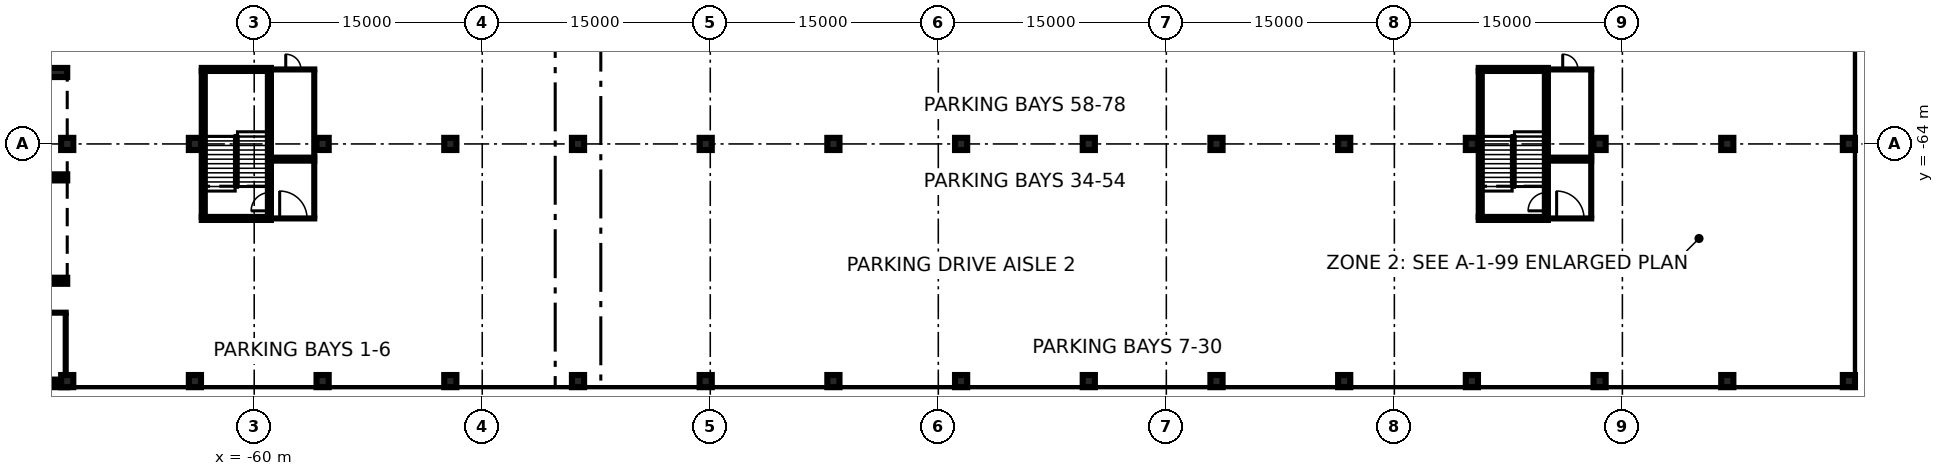
"""IFC4 building model, lengths in metres.
Left out: names, types, materials, properties, quantities, classifications, styles, units other than length and angle.
Written with IfcOpenShell. Run it as: python <this file> out.ifc"""

import sys

from ifc_helpers import new_model, si_unit, direction, frame, frame_2d, origin, origin_2d, place, context, subcontext, project, spatial, rectangle, extrude, element, fill, save


model = new_model("IFC4")
c1 = context("Model", 3, precision=1e-05, world=origin(), true_north=direction((0.0, 1.0)))
c2 = subcontext(c1, "Body", "Model", "MODEL_VIEW")
j1 = project(units=[si_unit("LENGTHUNIT", "METRE"), si_unit("PLANEANGLEUNIT", "RADIAN")], contexts=[c1])
p1 = place(None, origin())
s1 = spatial("IfcSite", under=j1, at=p1, CompositionType="ELEMENT")
p2 = place(p1, origin())
s2 = spatial("IfcBuilding", under=s1, at=p2, CompositionType="ELEMENT")
p3 = place(p2, frame((0.0, 0.0, -12.0)))
s3 = spatial("IfcBuildingStorey", under=s2, at=p3, CompositionType="ELEMENT", Elevation=-12.0)
p4 = place(p3, frame((-123.6, -80.45, 0.0), z_axis=(0.0, 0.0, 1.0), x_axis=(1.0, 0.0, 0.0)))
e1 = element("IfcWall", 1, at=p4, inside=s3, PredefinedType="USERDEFINED", context=c2, shape_type="SweptSolid", body=[
    extrude(rectangle(XDim=169.8, YDim=0.9, at=frame_2d((84.9, 0.0))), origin(), (0.0, 0.0, 1.0), 11.55),
])
p5 = place(p3, frame((45.75, -80.0, 0.0), z_axis=(0.0, 0.0, 1.0), x_axis=(0.0, 1.0, 0.0)))
e2 = element("IfcWall", 2, at=p5, inside=s3, PredefinedType="USERDEFINED", context=c2, shape_type="SweptSolid", body=[
    extrude(rectangle(XDim=160.0, YDim=0.9, at=frame_2d((80.0, 0.0))), origin(), (0.0, 0.0, 1.0), 11.55),
])
p6 = place(p2, frame((0.0, 0.0, -3.6)))
s4 = spatial("IfcBuildingStorey", under=s2, at=p6, CompositionType="ELEMENT", Elevation=-3.6)
for number, where, z_axis, x_axis in (
    (3, (-72.3, -79.6, -0.4), (0.0, 0.0, 1.0), (1.0, 0.0, 0.0)),
    (4, (-72.3, -64.0, -0.4), (0.0, 0.0, 1.0), (1.0, 0.0, 0.0)),
    (5, (-63.9, -79.6, -0.4), (0.0, 0.0, 1.0), (1.0, 0.0, 0.0)),
    (6, (-63.9, -64.0, -0.4), (0.0, 0.0, 1.0), (1.0, 0.0, 0.0)),
    (7, (-55.5, -79.6, -0.4), (0.0, 0.0, 1.0), (1.0, 0.0, 0.0)),
    (8, (-55.5, -64.0, -0.4), (0.0, 0.0, 1.0), (1.0, 0.0, 0.0)),
    (9, (-47.1, -79.6, -0.4), (0.0, 0.0, 1.0), (1.0, 0.0, 0.0)),
    (10, (-47.1, -64.0, -0.4), (0.0, 0.0, 1.0), (1.0, 0.0, 0.0)),
    (11, (-38.7, -79.6, -0.4), (0.0, 0.0, 1.0), (1.0, 0.0, 0.0)),
    (12, (-38.7, -64.0, -0.4), (0.0, 0.0, 1.0), (1.0, 0.0, 0.0)),
    (13, (-30.3, -79.6, -0.4), (0.0, 0.0, 1.0), (1.0, 0.0, 0.0)),
    (14, (-30.3, -64.0, -0.4), (0.0, 0.0, 1.0), (1.0, 0.0, 0.0)),
    (15, (-21.9, -79.6, -0.4), (0.0, 0.0, 1.0), (1.0, 0.0, 0.0)),
    (16, (-21.9, -64.0, -0.4), (0.0, 0.0, 1.0), (1.0, 0.0, 0.0)),
    (17, (-13.5, -79.6, -0.4), (0.0, 0.0, 1.0), (1.0, 0.0, 0.0)),
    (18, (-13.5, -64.0, -0.4), (0.0, 0.0, 1.0), (1.0, 0.0, 0.0)),
    (19, (-5.1, -79.6, -0.4), (0.0, 0.0, 1.0), (1.0, 0.0, 0.0)),
    (20, (-5.1, -64.0, -0.4), (0.0, 0.0, 1.0), (1.0, 0.0, 0.0)),
    (21, (3.3, -79.6, -0.4), (0.0, 0.0, 1.0), (1.0, 0.0, 0.0)),
    (22, (3.3, -64.0, -0.4), (0.0, 0.0, 1.0), (1.0, 0.0, 0.0)),
    (23, (11.7, -79.6, -0.4), (0.0, 0.0, 1.0), (1.0, 0.0, 0.0)),
    (24, (11.7, -64.0, -0.4), (0.0, 0.0, 1.0), (1.0, 0.0, 0.0)),
    (25, (20.1, -79.6, -0.4), (0.0, 0.0, 1.0), (1.0, 0.0, 0.0)),
    (26, (20.1, -64.0, -0.4), (0.0, 0.0, 1.0), (1.0, 0.0, 0.0)),
    (27, (28.5, -79.6, -0.4), (0.0, 0.0, 1.0), (1.0, 0.0, 0.0)),
    (28, (28.5, -64.0, -0.4), (0.0, 0.0, 1.0), (1.0, 0.0, 0.0)),
    (29, (36.9, -79.6, -0.4), (0.0, 0.0, 1.0), (1.0, 0.0, 0.0)),
    (30, (36.9, -64.0, -0.4), (0.0, 0.0, 1.0), (1.0, 0.0, 0.0)),
    (31, (44.9, -79.6, -0.4), (0.0, 0.0, 1.0), (1.0, 0.0, 0.0)),
    (32, (44.9, -64.0, -0.4), (0.0, 0.0, 1.0), (1.0, 0.0, 0.0)),
):
    element("IfcColumn", number, at=place(p6, frame(where, z_axis=z_axis, x_axis=x_axis)), inside=s4, PredefinedType="COLUMN", context=c2, shape_type="SweptSolid", body=[
        extrude(rectangle(XDim=0.8, YDim=0.8, at=origin_2d()), origin(), (0.0, 0.0, 1.0), 3.55),
    ])
p7 = place(p6, frame((-79.3, -79.5, 0.0), z_axis=(0.0, 0.0, 1.0), x_axis=(1.0, 0.0, 0.0)))
e33 = element("IfcWall", 33, at=p7, inside=s4, PredefinedType="PARTITIONING", context=c2, shape_type="SweptSolid", body=[
    extrude(rectangle(XDim=7.0, YDim=0.2, at=frame_2d((3.5, 0.0))), origin(), (0.0, 0.0, 1.0), 3.15),
])
p8 = place(p6, frame((-79.3, -75.1, 0.0), z_axis=(0.0, 0.0, 1.0), x_axis=(1.0, 0.0, 0.0)))
e34 = element("IfcWall", 34, at=p8, inside=s4, PredefinedType="PARTITIONING", context=c2, shape_type="SweptSolid", body=[
    extrude(rectangle(XDim=7.0, YDim=0.2, at=frame_2d((3.5, 0.0))), origin(), (0.0, 0.0, 1.0), 3.15),
])
p9 = place(p8, frame((3.0, 0.0, 0.0)))
e35 = element("IfcOpeningElement", 35, at=p9, cuts=e34, PredefinedType="OPENING", context=c2, shape_type="SweptSolid", body=[
    extrude(rectangle(XDim=1.0, YDim=2.1, at=frame_2d((0.5, 1.05))), frame((0.0, 0.11, 0.0), z_axis=(0.0, -1.0, 0.0), x_axis=(1.0, 0.0, 0.0)), (0.0, 0.0, 1.0), 0.22),
])
p10 = place(p6, frame((-72.4, -79.2, 0.0), z_axis=(0.0, 0.0, 1.0), x_axis=(0.0, 1.0, 0.0)))
e36 = element("IfcWall", 36, at=p10, inside=s4, PredefinedType="PARTITIONING", context=c2, shape_type="SweptSolid", body=[
    extrude(rectangle(XDim=4.0, YDim=0.2, at=frame_2d((2.0, 0.0))), origin(), (0.0, 0.0, 1.0), 3.15),
])
p11 = place(p6, frame((-58.9, -68.9, 0.0), z_axis=(0.0, 0.0, 1.0), x_axis=(1.0, 0.0, 0.0)))
e37 = element("IfcWall", 37, at=p11, inside=s4, PredefinedType="PARTITIONING", context=c2, shape_type="SweptSolid", body=[
    extrude(rectangle(XDim=2.95, YDim=0.2, at=frame_2d((1.475, 0.0))), origin(), (0.0, 0.0, 1.0), 3.15),
])
p12 = place(p11, frame((0.575, 0.0, 0.0)))
e38 = element("IfcOpeningElement", 38, at=p12, cuts=e37, PredefinedType="OPENING", context=c2, shape_type="SweptSolid", body=[
    extrude(rectangle(XDim=1.8, YDim=2.1, at=frame_2d((0.9, 1.05))), frame((0.0, 0.11, 0.0), z_axis=(0.0, -1.0, 0.0), x_axis=(1.0, 0.0, 0.0)), (0.0, 0.0, 1.0), 0.22),
])
p13 = place(p6, frame((-58.9, -65.1, 0.0), z_axis=(0.0, 0.0, 1.0), x_axis=(1.0, 0.0, 0.0)))
e39 = element("IfcWall", 39, at=p13, inside=s4, PredefinedType="PARTITIONING", context=c2, shape_type="SweptSolid", body=[
    extrude(rectangle(XDim=2.95, YDim=0.2, at=frame_2d((1.475, 0.0))), origin(), (0.0, 0.0, 1.0), 3.15),
])
p14 = place(p6, frame((-56.05, -68.8, 0.0), z_axis=(0.0, 0.0, 1.0), x_axis=(0.0, 1.0, 0.0)))
e40 = element("IfcWall", 40, at=p14, inside=s4, PredefinedType="PARTITIONING", context=c2, shape_type="SweptSolid", body=[
    extrude(rectangle(XDim=3.6, YDim=0.2, at=frame_2d((1.8, 0.0))), origin(), (0.0, 0.0, 1.0), 3.15),
])
p15 = place(p6, frame((-58.9, -64.9, 0.0), z_axis=(0.0, 0.0, 1.0), x_axis=(1.0, 0.0, 0.0)))
e41 = element("IfcWall", 41, at=p15, inside=s4, PredefinedType="PARTITIONING", context=c2, shape_type="SweptSolid", body=[
    extrude(rectangle(XDim=2.95, YDim=0.2, at=frame_2d((1.475, 0.0))), origin(), (0.0, 0.0, 1.0), 3.15),
])
p16 = place(p6, frame((-58.9, -59.1, 0.0), z_axis=(0.0, 0.0, 1.0), x_axis=(1.0, 0.0, 0.0)))
e42 = element("IfcWall", 42, at=p16, inside=s4, PredefinedType="PARTITIONING", context=c2, shape_type="SweptSolid", body=[
    extrude(rectangle(XDim=2.95, YDim=0.2, at=frame_2d((1.475, 0.0))), origin(), (0.0, 0.0, 1.0), 3.15),
])
p17 = place(p16, frame((0.975, 0.0, 0.0)))
e43 = element("IfcOpeningElement", 43, at=p17, cuts=e42, PredefinedType="OPENING", context=c2, shape_type="SweptSolid", body=[
    extrude(rectangle(XDim=1.0, YDim=2.1, at=frame_2d((0.5, 1.05))), frame((0.0, 0.11, 0.0), z_axis=(0.0, -1.0, 0.0), x_axis=(1.0, 0.0, 0.0)), (0.0, 0.0, 1.0), 0.22),
])
p18 = place(p6, frame((-56.05, -64.8, 0.0), z_axis=(0.0, 0.0, 1.0), x_axis=(0.0, 1.0, 0.0)))
e44 = element("IfcWall", 44, at=p18, inside=s4, PredefinedType="PARTITIONING", context=c2, shape_type="SweptSolid", body=[
    extrude(rectangle(XDim=5.6, YDim=0.2, at=frame_2d((2.8, 0.0))), origin(), (0.0, 0.0, 1.0), 3.15),
])
p19 = place(p6, frame((25.1, -68.9, 0.0), z_axis=(0.0, 0.0, 1.0), x_axis=(1.0, 0.0, 0.0)))
e45 = element("IfcWall", 45, at=p19, inside=s4, PredefinedType="PARTITIONING", context=c2, shape_type="SweptSolid", body=[
    extrude(rectangle(XDim=2.95, YDim=0.2, at=frame_2d((1.475, 0.0))), origin(), (0.0, 0.0, 1.0), 3.15),
])
p20 = place(p19, frame((0.575, 0.0, 0.0)))
e46 = element("IfcOpeningElement", 46, at=p20, cuts=e45, PredefinedType="OPENING", context=c2, shape_type="SweptSolid", body=[
    extrude(rectangle(XDim=1.8, YDim=2.1, at=frame_2d((0.9, 1.05))), frame((0.0, 0.11, 0.0), z_axis=(0.0, -1.0, 0.0), x_axis=(1.0, 0.0, 0.0)), (0.0, 0.0, 1.0), 0.22),
])
p21 = place(p6, frame((25.1, -65.1, 0.0), z_axis=(0.0, 0.0, 1.0), x_axis=(1.0, 0.0, 0.0)))
e47 = element("IfcWall", 47, at=p21, inside=s4, PredefinedType="PARTITIONING", context=c2, shape_type="SweptSolid", body=[
    extrude(rectangle(XDim=2.95, YDim=0.2, at=frame_2d((1.475, 0.0))), origin(), (0.0, 0.0, 1.0), 3.15),
])
p22 = place(p6, frame((27.95, -68.8, 0.0), z_axis=(0.0, 0.0, 1.0), x_axis=(0.0, 1.0, 0.0)))
e48 = element("IfcWall", 48, at=p22, inside=s4, PredefinedType="PARTITIONING", context=c2, shape_type="SweptSolid", body=[
    extrude(rectangle(XDim=3.6, YDim=0.2, at=frame_2d((1.8, 0.0))), origin(), (0.0, 0.0, 1.0), 3.15),
])
p23 = place(p6, frame((25.1, -64.9, 0.0), z_axis=(0.0, 0.0, 1.0), x_axis=(1.0, 0.0, 0.0)))
e49 = element("IfcWall", 49, at=p23, inside=s4, PredefinedType="PARTITIONING", context=c2, shape_type="SweptSolid", body=[
    extrude(rectangle(XDim=2.95, YDim=0.2, at=frame_2d((1.475, 0.0))), origin(), (0.0, 0.0, 1.0), 3.15),
])
p24 = place(p6, frame((25.1, -59.1, 0.0), z_axis=(0.0, 0.0, 1.0), x_axis=(1.0, 0.0, 0.0)))
e50 = element("IfcWall", 50, at=p24, inside=s4, PredefinedType="PARTITIONING", context=c2, shape_type="SweptSolid", body=[
    extrude(rectangle(XDim=2.95, YDim=0.2, at=frame_2d((1.475, 0.0))), origin(), (0.0, 0.0, 1.0), 3.15),
])
p25 = place(p24, frame((0.975, 0.0, 0.0)))
e51 = element("IfcOpeningElement", 51, at=p25, cuts=e50, PredefinedType="OPENING", context=c2, shape_type="SweptSolid", body=[
    extrude(rectangle(XDim=1.0, YDim=2.1, at=frame_2d((0.5, 1.05))), frame((0.0, 0.11, 0.0), z_axis=(0.0, -1.0, 0.0), x_axis=(1.0, 0.0, 0.0)), (0.0, 0.0, 1.0), 0.22),
])
p26 = place(p6, frame((27.95, -64.8, 0.0), z_axis=(0.0, 0.0, 1.0), x_axis=(0.0, 1.0, 0.0)))
e52 = element("IfcWall", 52, at=p26, inside=s4, PredefinedType="PARTITIONING", context=c2, shape_type="SweptSolid", body=[
    extrude(rectangle(XDim=5.6, YDim=0.2, at=frame_2d((2.8, 0.0))), origin(), (0.0, 0.0, 1.0), 3.15),
])
p27 = place(p6, frame((-63.35, -68.8, 0.0), z_axis=(0.0, 0.0, 1.0), x_axis=(0.0, 1.0, 0.0)))
e53 = element("IfcWall", 53, at=p27, inside=s4, PredefinedType="SOLIDWALL", context=c2, shape_type="SweptSolid", body=[
    extrude(rectangle(XDim=9.6, YDim=0.2, at=frame_2d((4.8, 0.0))), origin(), (0.0, 0.0, 1.0), 3.15),
])
p28 = place(p6, frame((-59.0, -68.8, 0.0), z_axis=(0.0, 0.0, 1.0), x_axis=(0.0, 1.0, 0.0)))
e54 = element("IfcWall", 54, at=p28, inside=s4, PredefinedType="SOLIDWALL", context=c2, shape_type="SweptSolid", body=[
    extrude(rectangle(XDim=9.6, YDim=0.2, at=frame_2d((4.8, 0.0))), origin(), (0.0, 0.0, 1.0), 3.15),
])
p29 = place(p28, frame((0.4, 0.0, 0.0)))
e55 = element("IfcOpeningElement", 55, at=p29, cuts=e54, PredefinedType="OPENING", context=c2, shape_type="SweptSolid", body=[
    extrude(rectangle(XDim=1.2, YDim=2.1, at=frame_2d((0.6, 1.05))), frame((0.0, 0.11, 0.0), z_axis=(0.0, -1.0, 0.0), x_axis=(1.0, 0.0, 0.0)), (0.0, 0.0, 1.0), 0.22),
])
for number, where, z_axis, x_axis in (
    (56, (-58.9, -68.9, 0.0), (0.0, 0.0, 1.0), (-1.0, 0.0, 0.0)),
    (57, (-63.45, -59.1, 0.0), (0.0, 0.0, 1.0), (1.0, 0.0, 0.0)),
):
    element("IfcWall", number, at=place(p6, frame(where, z_axis=z_axis, x_axis=x_axis)), inside=s4, PredefinedType="SOLIDWALL", context=c2, shape_type="SweptSolid", body=[
        extrude(rectangle(XDim=4.55, YDim=0.2, at=frame_2d((2.275, 0.0))), origin(), (0.0, 0.0, 1.0), 3.15),
    ])
p30 = place(p6, frame((20.65, -68.8, 0.0), z_axis=(0.0, 0.0, 1.0), x_axis=(0.0, 1.0, 0.0)))
e58 = element("IfcWall", 58, at=p30, inside=s4, PredefinedType="SOLIDWALL", context=c2, shape_type="SweptSolid", body=[
    extrude(rectangle(XDim=9.6, YDim=0.2, at=frame_2d((4.8, 0.0))), origin(), (0.0, 0.0, 1.0), 3.15),
])
p31 = place(p6, frame((25.0, -68.8, 0.0), z_axis=(0.0, 0.0, 1.0), x_axis=(0.0, 1.0, 0.0)))
e59 = element("IfcWall", 59, at=p31, inside=s4, PredefinedType="SOLIDWALL", context=c2, shape_type="SweptSolid", body=[
    extrude(rectangle(XDim=9.6, YDim=0.2, at=frame_2d((4.8, 0.0))), origin(), (0.0, 0.0, 1.0), 3.15),
])
p32 = place(p31, frame((0.4, 0.0, 0.0)))
e60 = element("IfcOpeningElement", 60, at=p32, cuts=e59, PredefinedType="OPENING", context=c2, shape_type="SweptSolid", body=[
    extrude(rectangle(XDim=1.2, YDim=2.1, at=frame_2d((0.6, 1.05))), frame((0.0, 0.11, 0.0), z_axis=(0.0, -1.0, 0.0), x_axis=(1.0, 0.0, 0.0)), (0.0, 0.0, 1.0), 0.22),
])
for number, where, z_axis, x_axis in (
    (61, (25.1, -68.9, 0.0), (0.0, 0.0, 1.0), (-1.0, 0.0, 0.0)),
    (62, (20.55, -59.1, 0.0), (0.0, 0.0, 1.0), (1.0, 0.0, 0.0)),
):
    element("IfcWall", number, at=place(p6, frame(where, z_axis=z_axis, x_axis=x_axis)), inside=s4, PredefinedType="SOLIDWALL", context=c2, shape_type="SweptSolid", body=[
        extrude(rectangle(XDim=4.55, YDim=0.2, at=frame_2d((2.275, 0.0))), origin(), (0.0, 0.0, 1.0), 3.15),
    ])
for number, where, z_axis, x_axis in (
    (63, (-114.3, -79.8, 0.0), (0.0, 0.0, 1.0), (1.0, 0.0, 0.0)),
    (64, (-114.3, -73.0, 0.0), (0.0, 0.0, 1.0), (1.0, 0.0, 0.0)),
):
    element("IfcWall", number, at=place(p6, frame(where, z_axis=z_axis, x_axis=x_axis)), inside=s4, PredefinedType="SOLIDWALL", context=c2, shape_type="SweptSolid", body=[
        extrude(rectangle(XDim=42.0, YDim=0.4, at=frame_2d((21.0, 0.0))), origin(), (0.0, 0.0, 1.0), 3.15),
    ])
p33 = place(p6, frame((-109.1, -66.2, 0.0), z_axis=(0.0, 0.0, 1.0), x_axis=(1.0, 0.0, 0.0)))
e65 = element("IfcWall", 65, at=p33, inside=s4, PredefinedType="SOLIDWALL", context=c2, shape_type="SweptSolid", body=[
    extrude(rectangle(XDim=36.8, YDim=0.4, at=frame_2d((18.4, 0.0))), origin(), (0.0, 0.0, 1.0), 3.15),
])
p34 = place(p6, frame((-109.1, -59.3, 0.0), z_axis=(0.0, 0.0, 1.0), x_axis=(1.0, 0.0, 0.0)))
e66 = element("IfcWall", 66, at=p34, inside=s4, PredefinedType="SOLIDWALL", context=c2, shape_type="SweptSolid", body=[
    extrude(rectangle(XDim=36.8, YDim=0.6, at=frame_2d((18.4, 0.0))), origin(), (0.0, 0.0, 1.0), 3.15),
])
p35 = place(p12, origin())
e67 = element("IfcDoor", 67, at=p35, inside=s4, OperationType="DOUBLE_DOOR_SINGLE_SWING", PredefinedType="DOOR", context=c2, shape_type="SweptSolid", body=[
    extrude(rectangle(XDim=1.8, YDim=2.1, at=frame_2d((0.9, 1.05))), frame((0.0, 0.025, 0.0), z_axis=(0.0, -1.0, 0.0), x_axis=(1.0, 0.0, 0.0)), (0.0, 0.0, 1.0), 0.05),
])
fill(e38, e67)
p36 = place(p17, origin())
e68 = element("IfcDoor", 68, at=p36, inside=s4, OperationType="SINGLE_SWING_LEFT", PredefinedType="DOOR", context=c2, shape_type="SweptSolid", body=[
    extrude(rectangle(XDim=1.0, YDim=2.1, at=frame_2d((0.5, 1.05))), frame((0.0, 0.025, 0.0), z_axis=(0.0, -1.0, 0.0), x_axis=(1.0, 0.0, 0.0)), (0.0, 0.0, 1.0), 0.05),
])
fill(e43, e68)
p37 = place(p20, origin())
e69 = element("IfcDoor", 69, at=p37, inside=s4, OperationType="DOUBLE_DOOR_SINGLE_SWING", PredefinedType="DOOR", context=c2, shape_type="SweptSolid", body=[
    extrude(rectangle(XDim=1.8, YDim=2.1, at=frame_2d((0.9, 1.05))), frame((0.0, 0.025, 0.0), z_axis=(0.0, -1.0, 0.0), x_axis=(1.0, 0.0, 0.0)), (0.0, 0.0, 1.0), 0.05),
])
fill(e46, e69)
p38 = place(p25, origin())
e70 = element("IfcDoor", 70, at=p38, inside=s4, OperationType="SINGLE_SWING_LEFT", PredefinedType="DOOR", context=c2, shape_type="SweptSolid", body=[
    extrude(rectangle(XDim=1.0, YDim=2.1, at=frame_2d((0.5, 1.05))), frame((0.0, 0.025, 0.0), z_axis=(0.0, -1.0, 0.0), x_axis=(1.0, 0.0, 0.0)), (0.0, 0.0, 1.0), 0.05),
])
fill(e51, e70)
p39 = place(p29, origin())
e71 = element("IfcDoor", 71, at=p39, inside=s4, OperationType="SINGLE_SWING_LEFT", PredefinedType="DOOR", context=c2, shape_type="SweptSolid", body=[
    extrude(rectangle(XDim=1.2, YDim=2.1, at=frame_2d((0.6, 1.05))), frame((0.0, 0.025, 0.0), z_axis=(0.0, -1.0, 0.0), x_axis=(1.0, 0.0, 0.0)), (0.0, 0.0, 1.0), 0.05),
])
fill(e55, e71)
p40 = place(p32, origin())
e72 = element("IfcDoor", 72, at=p40, inside=s4, OperationType="SINGLE_SWING_LEFT", PredefinedType="DOOR", context=c2, shape_type="SweptSolid", body=[
    extrude(rectangle(XDim=1.2, YDim=2.1, at=frame_2d((0.6, 1.05))), frame((0.0, 0.025, 0.0), z_axis=(0.0, -1.0, 0.0), x_axis=(1.0, 0.0, 0.0)), (0.0, 0.0, 1.0), 0.05),
])
fill(e60, e72)
save(model, sys.argv[1])
